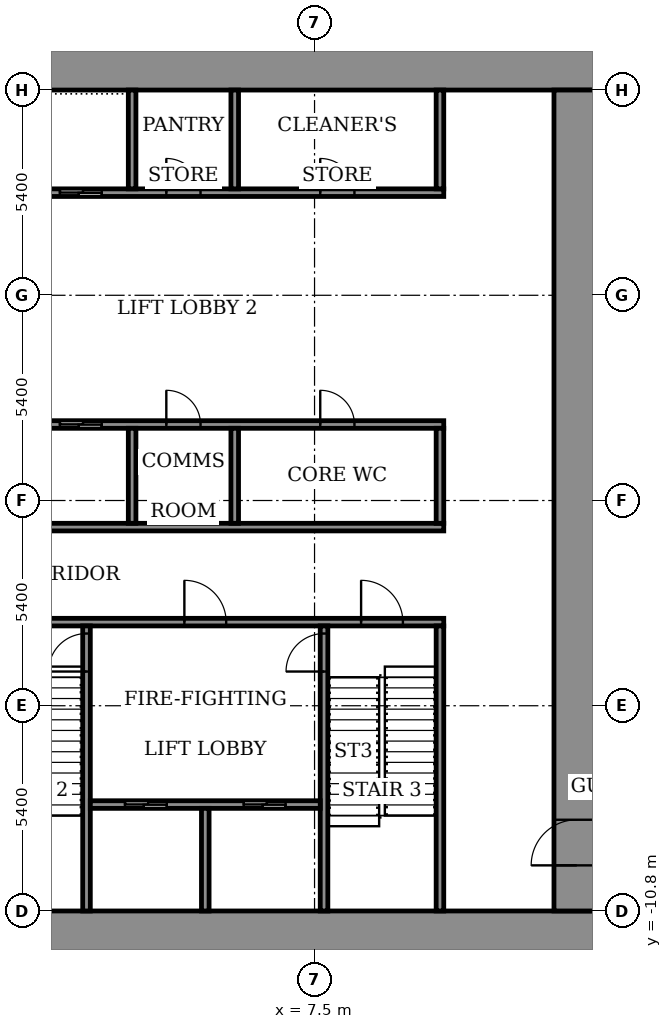
"""IFC4 building model, lengths in metres.
Left out: names, types, materials, properties, quantities, classifications, styles, units other than length and angle.
Written with IfcOpenShell. Run it as: python <this file> out.ifc"""

import sys

from ifc_helpers import new_model, si_unit, direction, frame, frame_2d, origin, place, context, subcontext, project, spatial, rectangle, extrude, element, fill, save


model = new_model("IFC4")
c1 = context("Model", 3, precision=1e-05, world=origin(), true_north=direction((0.0, 1.0)))
c2 = subcontext(c1, "Body", "Model", "MODEL_VIEW")
j1 = project(units=[si_unit("LENGTHUNIT", "METRE"), si_unit("PLANEANGLEUNIT", "RADIAN")], contexts=[c1])
p1 = place(None, origin())
s1 = spatial("IfcSite", under=j1, at=p1, CompositionType="ELEMENT")
p2 = place(p1, origin())
s2 = spatial("IfcBuilding", under=s1, at=p2, CompositionType="ELEMENT")
p3 = place(p2, frame((0.0, 0.0, 6.0)))
s3 = spatial("IfcBuildingStorey", under=s2, at=p3, CompositionType="ELEMENT", Elevation=6.0)
for number, where, z_axis, x_axis in (
    (1, (-15.0, -11.4, 0.0), (0.0, 0.0, 1.0), (1.0, 0.0, 0.0)),
    (2, (-15.0, 11.4, 0.0), (0.0, 0.0, 1.0), (1.0, 0.0, 0.0)),
):
    element("IfcWall", number, at=place(p3, frame(where, z_axis=z_axis, x_axis=x_axis)), inside=s3, PredefinedType="SHEAR", context=c2, shape_type="SweptSolid", body=[
        extrude(rectangle(XDim=30.0, YDim=1.2, at=frame_2d((15.0, 0.0))), origin(), (0.0, 0.0, 1.0), 5.0),
    ])
p4 = place(p3, frame((14.4, -10.8, 0.0), z_axis=(0.0, 0.0, 1.0), x_axis=(0.0, 1.0, 0.0)))
e3 = element("IfcWall", 3, at=p4, inside=s3, PredefinedType="SHEAR", context=c2, shape_type="SweptSolid", body=[
    extrude(rectangle(XDim=21.6, YDim=1.2, at=frame_2d((10.8, 0.0))), origin(), (0.0, 0.0, 1.0), 5.0),
])
p5 = place(p4, frame((1.2, 0.0, 0.0)))
e4 = element("IfcOpeningElement", 4, at=p5, cuts=e3, PredefinedType="OPENING", context=c2, shape_type="SweptSolid", body=[
    extrude(rectangle(XDim=1.2, YDim=2.1, at=frame_2d((0.6, 1.05))), frame((0.0, 0.61, 0.0), z_axis=(0.0, -1.0, 0.0), x_axis=(1.0, 0.0, 0.0)), (0.0, 0.0, 1.0), 1.22),
])
p6 = place(p3, frame((-10.9, -3.2, 0.0), z_axis=(0.0, 0.0, 1.0), x_axis=(1.0, 0.0, 0.0)))
e5 = element("IfcWall", 5, at=p6, inside=s3, PredefinedType="SHEAR", context=c2, shape_type="SweptSolid", body=[
    extrude(rectangle(XDim=21.8, YDim=0.2, at=frame_2d((10.9, 0.0))), origin(), (0.0, 0.0, 1.0), 4.45),
])
p7 = place(p6, frame((1.075, 0.0, 0.0)))
e6 = element("IfcOpeningElement", 6, at=p7, cuts=e5, PredefinedType="OPENING", context=c2, shape_type="SweptSolid", body=[
    extrude(rectangle(XDim=1.1, YDim=2.1, at=frame_2d((0.55, 1.05))), frame((0.0, 0.11, 0.0), z_axis=(0.0, -1.0, 0.0), x_axis=(1.0, 0.0, 0.0)), (0.0, 0.0, 1.0), 0.22),
])
p8 = place(p6, frame((10.325, 0.0, 0.0)))
e7 = element("IfcOpeningElement", 7, at=p8, cuts=e5, PredefinedType="OPENING", context=c2, shape_type="SweptSolid", body=[
    extrude(rectangle(XDim=1.1, YDim=2.1, at=frame_2d((0.55, 1.05))), frame((0.0, 0.11, 0.0), z_axis=(0.0, -1.0, 0.0), x_axis=(1.0, 0.0, 0.0)), (0.0, 0.0, 1.0), 0.22),
])
p9 = place(p6, frame((19.625, 0.0, 0.0)))
e8 = element("IfcOpeningElement", 8, at=p9, cuts=e5, PredefinedType="OPENING", context=c2, shape_type="SweptSolid", body=[
    extrude(rectangle(XDim=1.1, YDim=2.1, at=frame_2d((0.55, 1.05))), frame((0.0, 0.11, 0.0), z_axis=(0.0, -1.0, 0.0), x_axis=(1.0, 0.0, 0.0)), (0.0, 0.0, 1.0), 0.22),
])
p10 = place(p6, frame((5.7, 0.0, 0.0)))
e9 = element("IfcOpeningElement", 9, at=p10, cuts=e5, PredefinedType="OPENING", context=c2, shape_type="SweptSolid", body=[
    extrude(rectangle(XDim=1.1, YDim=2.1, at=frame_2d((0.55, 1.05))), frame((0.0, 0.11, 0.0), z_axis=(0.0, -1.0, 0.0), x_axis=(1.0, 0.0, 0.0)), (0.0, 0.0, 1.0), 0.22),
])
p11 = place(p6, frame((14.975, 0.0, 0.0)))
e10 = element("IfcOpeningElement", 10, at=p11, cuts=e5, PredefinedType="OPENING", context=c2, shape_type="SweptSolid", body=[
    extrude(rectangle(XDim=1.1, YDim=2.1, at=frame_2d((0.55, 1.05))), frame((0.0, 0.11, 0.0), z_axis=(0.0, -1.0, 0.0), x_axis=(1.0, 0.0, 0.0)), (0.0, 0.0, 1.0), 0.22),
])
p12 = place(p3, frame((-10.9, -0.7, 0.0), z_axis=(0.0, 0.0, 1.0), x_axis=(1.0, 0.0, 0.0)))
e11 = element("IfcWall", 11, at=p12, inside=s3, PredefinedType="SHEAR", context=c2, shape_type="SweptSolid", body=[
    extrude(rectangle(XDim=21.8, YDim=0.2, at=frame_2d((10.9, 0.0))), origin(), (0.0, 0.0, 1.0), 4.45),
])
p13 = place(p3, frame((-10.9, 2.0, 0.0), z_axis=(0.0, 0.0, 1.0), x_axis=(1.0, 0.0, 0.0)))
e12 = element("IfcWall", 12, at=p13, inside=s3, PredefinedType="SHEAR", context=c2, shape_type="SweptSolid", body=[
    extrude(rectangle(XDim=21.8, YDim=0.2, at=frame_2d((10.9, 0.0))), origin(), (0.0, 0.0, 1.0), 4.45),
])
p14 = place(p13, frame((0.9, 0.0, 0.0)))
e13 = element("IfcOpeningElement", 13, at=p14, cuts=e12, PredefinedType="OPENING", context=c2, shape_type="SweptSolid", body=[
    extrude(rectangle(XDim=1.1, YDim=2.1, at=frame_2d((0.55, 1.05))), frame((0.0, 0.11, 0.0), z_axis=(0.0, -1.0, 0.0), x_axis=(1.0, 0.0, 0.0)), (0.0, 0.0, 1.0), 0.22),
])
p15 = place(p13, frame((3.6, 0.0, 0.0)))
e14 = element("IfcOpeningElement", 14, at=p15, cuts=e12, PredefinedType="OPENING", context=c2, shape_type="SweptSolid", body=[
    extrude(rectangle(XDim=1.1, YDim=2.1, at=frame_2d((0.55, 1.05))), frame((0.0, 0.11, 0.0), z_axis=(0.0, -1.0, 0.0), x_axis=(1.0, 0.0, 0.0)), (0.0, 0.0, 1.0), 0.22),
])
p16 = place(p13, frame((6.3, 0.0, 0.0)))
e15 = element("IfcOpeningElement", 15, at=p16, cuts=e12, PredefinedType="OPENING", context=c2, shape_type="SweptSolid", body=[
    extrude(rectangle(XDim=1.1, YDim=2.1, at=frame_2d((0.55, 1.05))), frame((0.0, 0.11, 0.0), z_axis=(0.0, -1.0, 0.0), x_axis=(1.0, 0.0, 0.0)), (0.0, 0.0, 1.0), 0.22),
])
p17 = place(p13, frame((9.0, 0.0, 0.0)))
e16 = element("IfcOpeningElement", 16, at=p17, cuts=e12, PredefinedType="OPENING", context=c2, shape_type="SweptSolid", body=[
    extrude(rectangle(XDim=1.1, YDim=2.1, at=frame_2d((0.55, 1.05))), frame((0.0, 0.11, 0.0), z_axis=(0.0, -1.0, 0.0), x_axis=(1.0, 0.0, 0.0)), (0.0, 0.0, 1.0), 0.22),
])
p18 = place(p13, frame((11.7, 0.0, 0.0)))
e17 = element("IfcOpeningElement", 17, at=p18, cuts=e12, PredefinedType="OPENING", context=c2, shape_type="SweptSolid", body=[
    extrude(rectangle(XDim=1.1, YDim=2.1, at=frame_2d((0.55, 1.05))), frame((0.0, 0.11, 0.0), z_axis=(0.0, -1.0, 0.0), x_axis=(1.0, 0.0, 0.0)), (0.0, 0.0, 1.0), 0.22),
])
p19 = place(p13, frame((14.5, 0.0, 0.0)))
e18 = element("IfcOpeningElement", 18, at=p19, cuts=e12, PredefinedType="OPENING", context=c2, shape_type="SweptSolid", body=[
    extrude(rectangle(XDim=0.9, YDim=2.1, at=frame_2d((0.45, 1.05))), frame((0.0, 0.11, 0.0), z_axis=(0.0, -1.0, 0.0), x_axis=(1.0, 0.0, 0.0)), (0.0, 0.0, 1.0), 0.22),
])
p20 = place(p13, frame((18.55, 0.0, 0.0)))
e19 = element("IfcOpeningElement", 19, at=p20, cuts=e12, PredefinedType="OPENING", context=c2, shape_type="SweptSolid", body=[
    extrude(rectangle(XDim=0.9, YDim=2.1, at=frame_2d((0.45, 1.05))), frame((0.0, 0.11, 0.0), z_axis=(0.0, -1.0, 0.0), x_axis=(1.0, 0.0, 0.0)), (0.0, 0.0, 1.0), 0.22),
])
p21 = place(p3, frame((-10.9, 8.1, 0.0), z_axis=(0.0, 0.0, 1.0), x_axis=(1.0, 0.0, 0.0)))
e20 = element("IfcWall", 20, at=p21, inside=s3, PredefinedType="SHEAR", context=c2, shape_type="SweptSolid", body=[
    extrude(rectangle(XDim=21.8, YDim=0.2, at=frame_2d((10.9, 0.0))), origin(), (0.0, 0.0, 1.0), 4.45),
])
p22 = place(p21, frame((0.9, 0.0, 0.0)))
e21 = element("IfcOpeningElement", 21, at=p22, cuts=e20, PredefinedType="OPENING", context=c2, shape_type="SweptSolid", body=[
    extrude(rectangle(XDim=1.1, YDim=2.1, at=frame_2d((0.55, 1.05))), frame((0.0, 0.11, 0.0), z_axis=(0.0, -1.0, 0.0), x_axis=(1.0, 0.0, 0.0)), (0.0, 0.0, 1.0), 0.22),
])
p23 = place(p21, frame((3.6, 0.0, 0.0)))
e22 = element("IfcOpeningElement", 22, at=p23, cuts=e20, PredefinedType="OPENING", context=c2, shape_type="SweptSolid", body=[
    extrude(rectangle(XDim=1.1, YDim=2.1, at=frame_2d((0.55, 1.05))), frame((0.0, 0.11, 0.0), z_axis=(0.0, -1.0, 0.0), x_axis=(1.0, 0.0, 0.0)), (0.0, 0.0, 1.0), 0.22),
])
p24 = place(p21, frame((6.3, 0.0, 0.0)))
e23 = element("IfcOpeningElement", 23, at=p24, cuts=e20, PredefinedType="OPENING", context=c2, shape_type="SweptSolid", body=[
    extrude(rectangle(XDim=1.1, YDim=2.1, at=frame_2d((0.55, 1.05))), frame((0.0, 0.11, 0.0), z_axis=(0.0, -1.0, 0.0), x_axis=(1.0, 0.0, 0.0)), (0.0, 0.0, 1.0), 0.22),
])
p25 = place(p21, frame((9.0, 0.0, 0.0)))
e24 = element("IfcOpeningElement", 24, at=p25, cuts=e20, PredefinedType="OPENING", context=c2, shape_type="SweptSolid", body=[
    extrude(rectangle(XDim=1.1, YDim=2.1, at=frame_2d((0.55, 1.05))), frame((0.0, 0.11, 0.0), z_axis=(0.0, -1.0, 0.0), x_axis=(1.0, 0.0, 0.0)), (0.0, 0.0, 1.0), 0.22),
])
p26 = place(p21, frame((11.7, 0.0, 0.0)))
e25 = element("IfcOpeningElement", 25, at=p26, cuts=e20, PredefinedType="OPENING", context=c2, shape_type="SweptSolid", body=[
    extrude(rectangle(XDim=1.1, YDim=2.1, at=frame_2d((0.55, 1.05))), frame((0.0, 0.11, 0.0), z_axis=(0.0, -1.0, 0.0), x_axis=(1.0, 0.0, 0.0)), (0.0, 0.0, 1.0), 0.22),
])
p27 = place(p21, frame((14.5, 0.0, 0.0)))
e26 = element("IfcOpeningElement", 26, at=p27, cuts=e20, PredefinedType="OPENING", context=c2, shape_type="SweptSolid", body=[
    extrude(rectangle(XDim=0.9, YDim=2.1, at=frame_2d((0.45, 1.05))), frame((0.0, 0.11, 0.0), z_axis=(0.0, -1.0, 0.0), x_axis=(1.0, 0.0, 0.0)), (0.0, 0.0, 1.0), 0.22),
])
p28 = place(p21, frame((18.55, 0.0, 0.0)))
e27 = element("IfcOpeningElement", 27, at=p28, cuts=e20, PredefinedType="OPENING", context=c2, shape_type="SweptSolid", body=[
    extrude(rectangle(XDim=0.9, YDim=2.1, at=frame_2d((0.45, 1.05))), frame((0.0, 0.11, 0.0), z_axis=(0.0, -1.0, 0.0), x_axis=(1.0, 0.0, 0.0)), (0.0, 0.0, 1.0), 0.22),
])
p29 = place(p3, frame((1.5, -10.8, 0.0), z_axis=(0.0, 0.0, 1.0), x_axis=(0.0, 1.0, 0.0)))
e28 = element("IfcWall", 28, at=p29, inside=s3, PredefinedType="SHEAR", context=c2, shape_type="SweptSolid", body=[
    extrude(rectangle(XDim=7.5, YDim=0.2, at=frame_2d((3.75, 0.0))), origin(), (0.0, 0.0, 1.0), 4.45),
])
p30 = place(p29, frame((6.3, 0.0, 0.0)))
e29 = element("IfcOpeningElement", 29, at=p30, cuts=e28, PredefinedType="OPENING", context=c2, shape_type="SweptSolid", body=[
    extrude(rectangle(XDim=1.0, YDim=2.1, at=frame_2d((0.5, 1.05))), frame((0.0, 0.11, 0.0), z_axis=(0.0, -1.0, 0.0), x_axis=(1.0, 0.0, 0.0)), (0.0, 0.0, 1.0), 0.22),
])
p31 = place(p3, frame((7.75, -10.8, 0.0), z_axis=(0.0, 0.0, 1.0), x_axis=(0.0, 1.0, 0.0)))
e30 = element("IfcWall", 30, at=p31, inside=s3, PredefinedType="SHEAR", context=c2, shape_type="SweptSolid", body=[
    extrude(rectangle(XDim=7.5, YDim=0.2, at=frame_2d((3.75, 0.0))), origin(), (0.0, 0.0, 1.0), 4.45),
])
p32 = place(p31, frame((6.3, 0.0, 0.0)))
e31 = element("IfcOpeningElement", 31, at=p32, cuts=e30, PredefinedType="OPENING", context=c2, shape_type="SweptSolid", body=[
    extrude(rectangle(XDim=1.0, YDim=2.1, at=frame_2d((0.5, 1.05))), frame((0.0, 0.11, 0.0), z_axis=(0.0, -1.0, 0.0), x_axis=(1.0, 0.0, 0.0)), (0.0, 0.0, 1.0), 0.22),
])
p33 = place(p3, frame((10.8, -10.8, 0.0), z_axis=(0.0, 0.0, 1.0), x_axis=(0.0, 1.0, 0.0)))
e32 = element("IfcWall", 32, at=p33, inside=s3, PredefinedType="SHEAR", context=c2, shape_type="SweptSolid", body=[
    extrude(rectangle(XDim=7.5, YDim=0.2, at=frame_2d((3.75, 0.0))), origin(), (0.0, 0.0, 1.0), 4.45),
])
p34 = place(p3, frame((1.6, -8.0, 0.0), z_axis=(0.0, 0.0, 1.0), x_axis=(1.0, 0.0, 0.0)))
e33 = element("IfcWall", 33, at=p34, inside=s3, PredefinedType="SHEAR", context=c2, shape_type="SweptSolid", body=[
    extrude(rectangle(XDim=6.05, YDim=0.2, at=frame_2d((3.025, 0.0))), origin(), (0.0, 0.0, 1.0), 4.45),
])
p35 = place(p34, frame((0.913, 0.0, 0.0)))
e34 = element("IfcOpeningElement", 34, at=p35, cuts=e33, PredefinedType="OPENING", context=c2, shape_type="SweptSolid", body=[
    extrude(rectangle(XDim=1.1, YDim=2.1, at=frame_2d((0.55, 1.05))), frame((0.0, 0.11, 0.0), z_axis=(0.0, -1.0, 0.0), x_axis=(1.0, 0.0, 0.0)), (0.0, 0.0, 1.0), 0.22),
])
p36 = place(p34, frame((4.038, 0.0, 0.0)))
e35 = element("IfcOpeningElement", 35, at=p36, cuts=e33, PredefinedType="OPENING", context=c2, shape_type="SweptSolid", body=[
    extrude(rectangle(XDim=1.1, YDim=2.1, at=frame_2d((0.55, 1.05))), frame((0.0, 0.11, 0.0), z_axis=(0.0, -1.0, 0.0), x_axis=(1.0, 0.0, 0.0)), (0.0, 0.0, 1.0), 0.22),
])
p37 = place(p3, frame((4.625, -10.8, 0.0), z_axis=(0.0, 0.0, 1.0), x_axis=(0.0, 1.0, 0.0)))
e36 = element("IfcWall", 36, at=p37, inside=s3, PredefinedType="SHEAR", context=c2, shape_type="SweptSolid", body=[
    extrude(rectangle(XDim=2.7, YDim=0.2, at=frame_2d((1.35, 0.0))), origin(), (0.0, 0.0, 1.0), 4.45),
])
p38 = place(p3, frame((2.7, -0.6, 0.0), z_axis=(0.0, 0.0, 1.0), x_axis=(0.0, 1.0, 0.0)))
e37 = element("IfcWall", 37, at=p38, inside=s3, PredefinedType="SHEAR", context=c2, shape_type="SweptSolid", body=[
    extrude(rectangle(XDim=2.5, YDim=0.2, at=frame_2d((1.25, 0.0))), origin(), (0.0, 0.0, 1.0), 4.45),
])
for number, where, z_axis, x_axis in (
    (38, (5.4, -0.6, 0.0), (0.0, 0.0, 1.0), (0.0, 1.0, 0.0)),
    (39, (10.8, -0.6, 0.0), (0.0, 0.0, 1.0), (0.0, 1.0, 0.0)),
):
    element("IfcWall", number, at=place(p3, frame(where, z_axis=z_axis, x_axis=x_axis)), inside=s3, PredefinedType="STANDARD", context=c2, shape_type="SweptSolid", body=[
        extrude(rectangle(XDim=2.5, YDim=0.2, at=frame_2d((1.25, 0.0))), origin(), (0.0, 0.0, 1.0), 4.45),
    ])
p39 = place(p3, frame((2.7, 8.2, 0.0), z_axis=(0.0, 0.0, 1.0), x_axis=(0.0, 1.0, 0.0)))
e40 = element("IfcWall", 40, at=p39, inside=s3, PredefinedType="SHEAR", context=c2, shape_type="SweptSolid", body=[
    extrude(rectangle(XDim=2.6, YDim=0.2, at=frame_2d((1.3, 0.0))), origin(), (0.0, 0.0, 1.0), 4.45),
])
for number, where, z_axis, x_axis in (
    (41, (5.4, 8.2, 0.0), (0.0, 0.0, 1.0), (0.0, 1.0, 0.0)),
    (42, (10.8, 8.2, 0.0), (0.0, 0.0, 1.0), (0.0, 1.0, 0.0)),
):
    element("IfcWall", number, at=place(p3, frame(where, z_axis=z_axis, x_axis=x_axis)), inside=s3, PredefinedType="STANDARD", context=c2, shape_type="SweptSolid", body=[
        extrude(rectangle(XDim=2.6, YDim=0.2, at=frame_2d((1.3, 0.0))), origin(), (0.0, 0.0, 1.0), 4.45),
    ])
p40 = place(p5, origin())
e43 = element("IfcDoor", 43, at=p40, inside=s3, OperationType="DOUBLE_DOOR_SINGLE_SWING", PredefinedType="DOOR", context=c2, shape_type="SweptSolid", body=[
    extrude(rectangle(XDim=1.2, YDim=2.1, at=frame_2d((0.6, 1.05))), frame((0.0, 0.025, 0.0), z_axis=(0.0, -1.0, 0.0), x_axis=(1.0, 0.0, 0.0)), (0.0, 0.0, 1.0), 0.05),
])
fill(e4, e43)
p41 = place(p18, origin())
e44 = element("IfcDoor", 44, at=p41, inside=s3, OperationType="SLIDING_TO_LEFT", PredefinedType="DOOR", context=c2, shape_type="SweptSolid", body=[
    extrude(rectangle(XDim=1.1, YDim=2.1, at=frame_2d((0.55, 1.05))), frame((0.0, 0.025, 0.0), z_axis=(0.0, -1.0, 0.0), x_axis=(1.0, 0.0, 0.0)), (0.0, 0.0, 1.0), 0.05),
])
fill(e17, e44)
p42 = place(p26, origin())
e45 = element("IfcDoor", 45, at=p42, inside=s3, OperationType="SLIDING_TO_LEFT", PredefinedType="DOOR", context=c2, shape_type="SweptSolid", body=[
    extrude(rectangle(XDim=1.1, YDim=2.1, at=frame_2d((0.55, 1.05))), frame((0.0, 0.025, 0.0), z_axis=(0.0, -1.0, 0.0), x_axis=(1.0, 0.0, 0.0)), (0.0, 0.0, 1.0), 0.05),
])
fill(e25, e45)
p43 = place(p19, origin())
e46 = element("IfcDoor", 46, at=p43, inside=s3, OperationType="SINGLE_SWING_LEFT", PredefinedType="DOOR", context=c2, shape_type="SweptSolid", body=[
    extrude(rectangle(XDim=0.9, YDim=2.1, at=frame_2d((0.45, 1.05))), frame((0.0, 0.025, 0.0), z_axis=(0.0, -1.0, 0.0), x_axis=(1.0, 0.0, 0.0)), (0.0, 0.0, 1.0), 0.05),
])
fill(e18, e46)
p44 = place(p20, origin())
e47 = element("IfcDoor", 47, at=p44, inside=s3, OperationType="SINGLE_SWING_RIGHT", PredefinedType="DOOR", context=c2, shape_type="SweptSolid", body=[
    extrude(rectangle(XDim=0.9, YDim=2.1, at=frame_2d((0.45, 1.05))), frame((0.0, 0.025, 0.0), z_axis=(0.0, -1.0, 0.0), x_axis=(1.0, 0.0, 0.0)), (0.0, 0.0, 1.0), 0.05),
])
fill(e19, e47)
p45 = place(p27, origin())
e48 = element("IfcDoor", 48, at=p45, inside=s3, OperationType="SINGLE_SWING_RIGHT", PredefinedType="DOOR", context=c2, shape_type="SweptSolid", body=[
    extrude(rectangle(XDim=0.9, YDim=2.1, at=frame_2d((0.45, 1.05))), frame((0.0, 0.025, 0.0), z_axis=(0.0, -1.0, 0.0), x_axis=(1.0, 0.0, 0.0)), (0.0, 0.0, 1.0), 0.05),
])
fill(e26, e48)
p46 = place(p28, origin())
e49 = element("IfcDoor", 49, at=p46, inside=s3, OperationType="SINGLE_SWING_RIGHT", PredefinedType="DOOR", context=c2, shape_type="SweptSolid", body=[
    extrude(rectangle(XDim=0.9, YDim=2.1, at=frame_2d((0.45, 1.05))), frame((0.0, 0.025, 0.0), z_axis=(0.0, -1.0, 0.0), x_axis=(1.0, 0.0, 0.0)), (0.0, 0.0, 1.0), 0.05),
])
fill(e27, e49)
p47 = place(p35, origin())
e50 = element("IfcDoor", 50, at=p47, inside=s3, OperationType="SLIDING_TO_LEFT", PredefinedType="DOOR", context=c2, shape_type="SweptSolid", body=[
    extrude(rectangle(XDim=1.1, YDim=2.1, at=frame_2d((0.55, 1.05))), frame((0.0, 0.025, 0.0), z_axis=(0.0, -1.0, 0.0), x_axis=(1.0, 0.0, 0.0)), (0.0, 0.0, 1.0), 0.05),
])
fill(e34, e50)
p48 = place(p36, origin())
e51 = element("IfcDoor", 51, at=p48, inside=s3, OperationType="SLIDING_TO_LEFT", PredefinedType="DOOR", context=c2, shape_type="SweptSolid", body=[
    extrude(rectangle(XDim=1.1, YDim=2.1, at=frame_2d((0.55, 1.05))), frame((0.0, 0.025, 0.0), z_axis=(0.0, -1.0, 0.0), x_axis=(1.0, 0.0, 0.0)), (0.0, 0.0, 1.0), 0.05),
])
fill(e35, e51)
p49 = place(p9, origin())
e52 = element("IfcDoor", 52, at=p49, inside=s3, OperationType="SINGLE_SWING_RIGHT", PredefinedType="DOOR", context=c2, shape_type="SweptSolid", body=[
    extrude(rectangle(XDim=1.1, YDim=2.1, at=frame_2d((0.55, 1.05))), frame((0.0, 0.025, 0.0), z_axis=(0.0, -1.0, 0.0), x_axis=(1.0, 0.0, 0.0)), (0.0, 0.0, 1.0), 0.05),
])
fill(e8, e52)
p50 = place(p11, origin())
e53 = element("IfcDoor", 53, at=p50, inside=s3, OperationType="SINGLE_SWING_LEFT", PredefinedType="DOOR", context=c2, shape_type="SweptSolid", body=[
    extrude(rectangle(XDim=1.1, YDim=2.1, at=frame_2d((0.55, 1.05))), frame((0.0, 0.025, 0.0), z_axis=(0.0, -1.0, 0.0), x_axis=(1.0, 0.0, 0.0)), (0.0, 0.0, 1.0), 0.05),
])
fill(e10, e53)
p51 = place(p30, origin())
e54 = element("IfcDoor", 54, at=p51, inside=s3, OperationType="SINGLE_SWING_RIGHT", PredefinedType="DOOR", context=c2, shape_type="SweptSolid", body=[
    extrude(rectangle(XDim=1.0, YDim=2.1, at=frame_2d((0.5, 1.05))), frame((0.0, 0.025, 0.0), z_axis=(0.0, -1.0, 0.0), x_axis=(1.0, 0.0, 0.0)), (0.0, 0.0, 1.0), 0.05),
])
fill(e29, e54)
p52 = place(p32, origin())
e55 = element("IfcDoor", 55, at=p52, inside=s3, OperationType="SINGLE_SWING_RIGHT", PredefinedType="DOOR", context=c2, shape_type="SweptSolid", body=[
    extrude(rectangle(XDim=1.0, YDim=2.1, at=frame_2d((0.5, 1.05))), frame((0.0, 0.025, 0.0), z_axis=(0.0, -1.0, 0.0), x_axis=(1.0, 0.0, 0.0)), (0.0, 0.0, 1.0), 0.05),
])
fill(e31, e55)
save(model, sys.argv[1])
